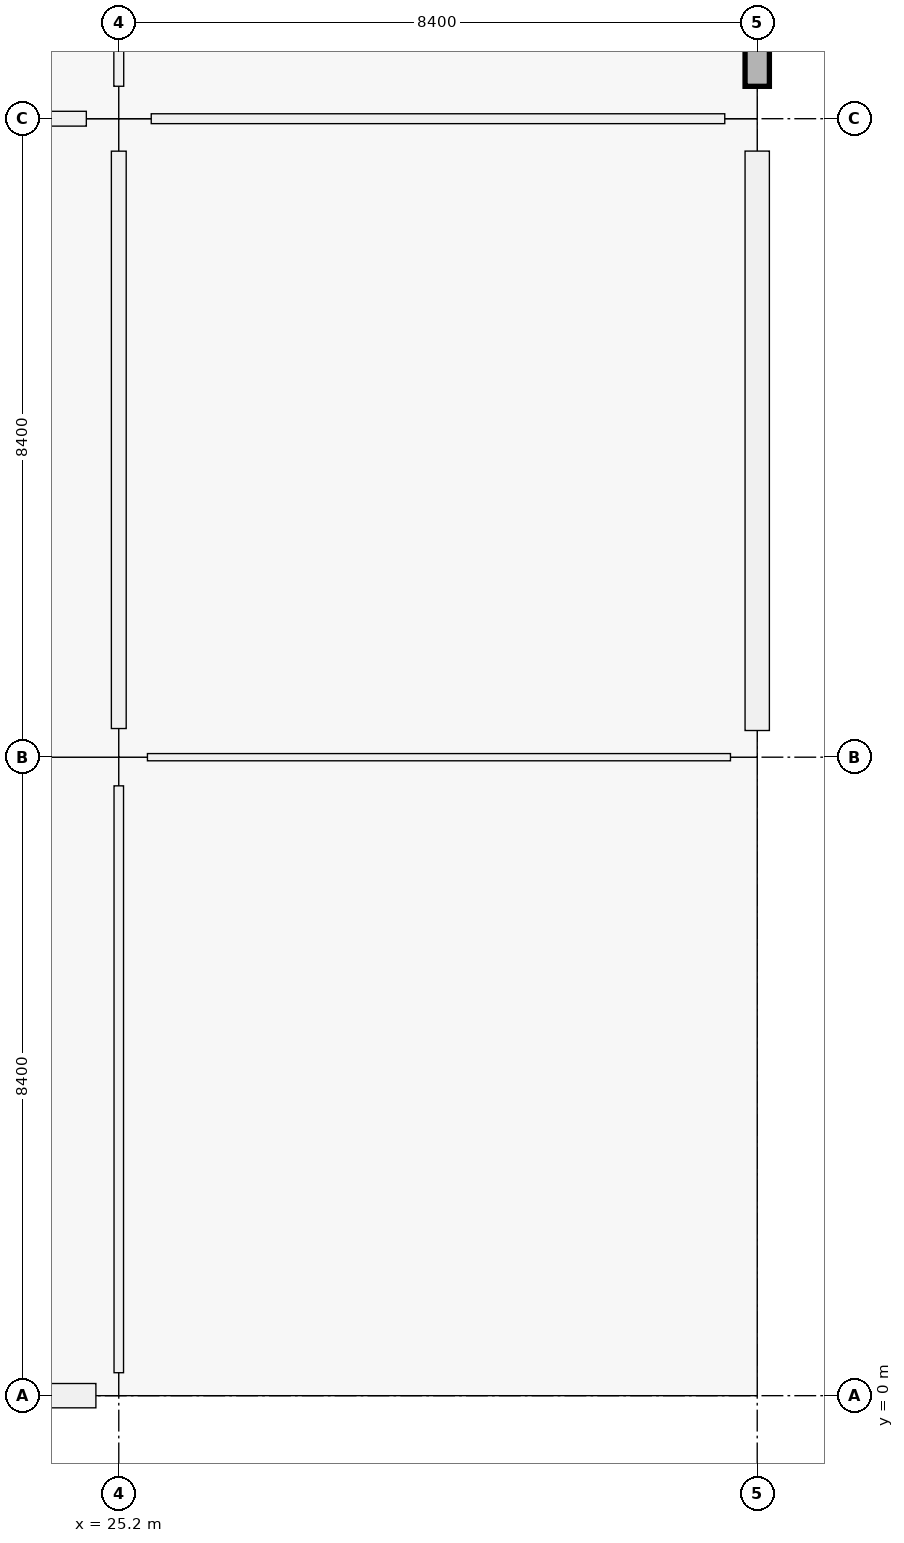
"""IFC4 building model, lengths in metres.
Left out: names, types, materials, properties, quantities, classifications, styles, units other than length and angle.
Written with IfcOpenShell. Run it as: python <this file> out.ifc"""

import sys

from ifc_helpers import new_model, si_unit, direction, frame, frame_2d, origin, origin_2d, place, context, subcontext, project, spatial, rectangle, extrude, element, fill, save


model = new_model("IFC4")
c1 = context("Model", 3, precision=1e-05, world=origin(), true_north=direction((0.0, 1.0)))
c2 = subcontext(c1, "Body", "Model", "MODEL_VIEW")
j1 = project(units=[si_unit("LENGTHUNIT", "METRE"), si_unit("PLANEANGLEUNIT", "RADIAN")], contexts=[c1])
p1 = place(None, origin())
s1 = spatial("IfcSite", under=j1, at=p1, CompositionType="ELEMENT")
p2 = place(p1, origin())
s2 = spatial("IfcBuilding", under=s1, at=p2, CompositionType="ELEMENT")
p3 = place(p2, origin())
s3 = spatial("IfcBuildingStorey", under=s2, at=p3, CompositionType="ELEMENT", Elevation=0.0)
p4 = place(p3, frame((25.2, 0.0, 0.0), z_axis=(0.0, 0.0, 1.0), x_axis=(1.0, 0.0, 0.0)))
e1 = element("IfcColumn", 1, at=p4, inside=s3, PredefinedType="COLUMN", context=c2, shape_type="SweptSolid", body=[
    extrude(rectangle(XDim=0.6, YDim=0.6, at=origin_2d()), origin(), (0.0, 0.0, 1.0), 5.76),
])
p5 = place(p3, frame((25.2, 8.4, 0.0), z_axis=(0.0, 0.0, 1.0), x_axis=(1.0, 0.0, 0.0)))
e2 = element("IfcColumn", 2, at=p5, inside=s3, PredefinedType="COLUMN", context=c2, shape_type="SweptSolid", body=[
    extrude(rectangle(XDim=0.75, YDim=0.75, at=origin_2d()), origin(), (0.0, 0.0, 1.0), 5.76),
])
p6 = place(p3, frame((25.2, 16.8, 0.0), z_axis=(0.0, 0.0, 1.0), x_axis=(1.0, 0.0, 0.0)))
e3 = element("IfcColumn", 3, at=p6, inside=s3, PredefinedType="COLUMN", context=c2, shape_type="SweptSolid", body=[
    extrude(rectangle(XDim=0.85, YDim=0.85, at=origin_2d()), origin(), (0.0, 0.0, 1.0), 5.76),
])
p7 = place(p3, frame((33.6, 0.0, 0.0), z_axis=(0.0, 0.0, 1.0), x_axis=(1.0, 0.0, 0.0)))
e4 = element("IfcColumn", 4, at=p7, inside=s3, PredefinedType="COLUMN", context=c2, shape_type="SweptSolid", body=[
    extrude(rectangle(XDim=0.65, YDim=0.65, at=origin_2d()), origin(), (0.0, 0.0, 1.0), 5.76),
])
p8 = place(p3, frame((33.6, 8.4, 0.0), z_axis=(0.0, 0.0, 1.0), x_axis=(1.0, 0.0, 0.0)))
e5 = element("IfcColumn", 5, at=p8, inside=s3, PredefinedType="COLUMN", context=c2, shape_type="SweptSolid", body=[
    extrude(rectangle(XDim=0.7, YDim=0.7, at=origin_2d()), origin(), (0.0, 0.0, 1.0), 5.76),
])
p9 = place(p3, frame((33.6, 16.8, 0.0), z_axis=(0.0, 0.0, 1.0), x_axis=(1.0, 0.0, 0.0)))
e6 = element("IfcColumn", 6, at=p9, inside=s3, PredefinedType="COLUMN", context=c2, shape_type="SweptSolid", body=[
    extrude(rectangle(XDim=0.85, YDim=0.85, at=origin_2d()), origin(), (0.0, 0.0, 1.0), 5.76),
])
p10 = place(p3, frame((24.899, 0.0, 0.0), z_axis=(0.0, 0.0, 1.0), x_axis=(-1.0, 0.0, 0.0)))
e7 = element("IfcWall", 7, at=p10, inside=s3, PredefinedType="SOLIDWALL", context=c2, shape_type="SweptSolid", body=[
    extrude(rectangle(XDim=7.773, YDim=0.32, at=frame_2d((3.886, 0.0))), origin(), (0.0, 0.0, 1.0), 4.7),
])
p11 = place(p10, frame((2.736, 0.0, 0.0)))
e8 = element("IfcOpeningElement", 8, at=p11, cuts=e7, PredefinedType="OPENING", context=c2, shape_type="SweptSolid", body=[
    extrude(rectangle(XDim=2.3, YDim=2.3, at=frame_2d((1.15, 1.15))), frame((0.0, 0.16, 0.0), z_axis=(0.0, -1.0, 0.0), x_axis=(1.0, 0.0, 0.0)), (0.0, 0.0, 1.0), 0.32),
])
p12 = place(p3, frame((33.6, 16.374, 0.0), z_axis=(0.0, 0.0, 1.0), x_axis=(0.0, -1.0, 0.0)))
e9 = element("IfcWall", 9, at=p12, inside=s3, PredefinedType="SOLIDWALL", context=c2, shape_type="SweptSolid", body=[
    extrude(rectangle(XDim=7.623, YDim=0.32, at=frame_2d((3.812, 0.0))), origin(), (0.0, 0.0, 1.0), 4.7),
])
p13 = place(p12, frame((2.462, 0.0, 0.9)))
e10 = element("IfcOpeningElement", 10, at=p13, cuts=e9, PredefinedType="OPENING", context=c2, shape_type="SweptSolid", body=[
    extrude(rectangle(XDim=2.7, YDim=1.2, at=frame_2d((1.35, 0.6))), frame((0.0, 0.16, 0.0), z_axis=(0.0, -1.0, 0.0), x_axis=(1.0, 0.0, 0.0)), (0.0, 0.0, 1.0), 0.32),
])
p14 = place(p3, frame((33.6, 24.774, 0.0), z_axis=(0.0, 0.0, 1.0), x_axis=(0.0, -1.0, 0.0)))
e11 = element("IfcWall", 11, at=p14, inside=s3, PredefinedType="SOLIDWALL", context=c2, shape_type="SweptSolid", body=[
    extrude(rectangle(XDim=7.548, YDim=0.32, at=frame_2d((3.774, 0.0))), origin(), (0.0, 0.0, 1.0), 4.7),
])
p15 = place(p14, frame((2.674, 0.0, 0.9)))
e12 = element("IfcOpeningElement", 12, at=p15, cuts=e11, PredefinedType="OPENING", context=c2, shape_type="SweptSolid", body=[
    extrude(rectangle(XDim=2.2, YDim=1.35, at=frame_2d((1.1, 0.675))), frame((0.0, 0.16, 0.0), z_axis=(0.0, -1.0, 0.0), x_axis=(1.0, 0.0, 0.0)), (0.0, 0.0, 1.0), 0.32),
])
p16 = place(p3, frame((17.227, 16.8, 0.0), z_axis=(0.0, 0.0, 1.0), x_axis=(1.0, 0.0, 0.0)))
e13 = element("IfcWall", 13, at=p16, inside=s3, PredefinedType="PARTITIONING", context=c2, shape_type="SweptSolid", body=[
    extrude(rectangle(XDim=7.546, YDim=0.195, at=frame_2d((3.773, 0.0))), origin(), (0.0, 0.0, 1.0), 3.66),
])
p17 = place(p16, frame((3.283, 0.0, 0.0)))
e14 = element("IfcOpeningElement", 14, at=p17, cuts=e13, PredefinedType="OPENING", context=c2, shape_type="SweptSolid", body=[
    extrude(rectangle(XDim=0.98, YDim=2.18, at=frame_2d((0.49, 1.09))), frame((0.0, 0.098, 0.0), z_axis=(0.0, -1.0, 0.0), x_axis=(1.0, 0.0, 0.0)), (0.0, 0.0, 1.0), 0.195),
])
p18 = place(p3, frame((25.577, 8.4, 0.0), z_axis=(0.0, 0.0, 1.0), x_axis=(1.0, 0.0, 0.0)))
e15 = element("IfcWall", 15, at=p18, inside=s3, PredefinedType="PARTITIONING", context=c2, shape_type="SweptSolid", body=[
    extrude(rectangle(XDim=7.671, YDim=0.095, at=frame_2d((3.835, 0.0))), origin(), (0.0, 0.0, 1.0), 3.66),
])
p19 = place(p18, frame((3.356, 0.0, 0.0)))
e16 = element("IfcOpeningElement", 16, at=p19, cuts=e15, PredefinedType="OPENING", context=c2, shape_type="SweptSolid", body=[
    extrude(rectangle(XDim=0.96, YDim=2.18, at=frame_2d((0.48, 1.09))), frame((0.0, 0.047, 0.0), z_axis=(0.0, -1.0, 0.0), x_axis=(1.0, 0.0, 0.0)), (0.0, 0.0, 1.0), 0.095),
])
p20 = place(p3, frame((25.627, 16.8, 0.0), z_axis=(0.0, 0.0, 1.0), x_axis=(1.0, 0.0, 0.0)))
e17 = element("IfcWall", 17, at=p20, inside=s3, PredefinedType="MOVABLE", context=c2, shape_type="SweptSolid", body=[
    extrude(rectangle(XDim=7.546, YDim=0.13, at=frame_2d((3.773, 0.0))), origin(), (0.0, 0.0, 1.0), 3.66),
])
p21 = place(p20, frame((3.303, 0.0, 0.0)))
e18 = element("IfcOpeningElement", 18, at=p21, cuts=e17, PredefinedType="OPENING", context=c2, shape_type="SweptSolid", body=[
    extrude(rectangle(XDim=0.94, YDim=2.15, at=frame_2d((0.47, 1.075))), frame((0.0, 0.065, 0.0), z_axis=(0.0, -1.0, 0.0), x_axis=(1.0, 0.0, 0.0)), (0.0, 0.0, 1.0), 0.13),
])
p22 = place(p3, frame((25.2, 0.302, 0.0), z_axis=(0.0, 0.0, 1.0), x_axis=(0.0, 1.0, 0.0)))
e19 = element("IfcWall", 19, at=p22, inside=s3, PredefinedType="PARTITIONING", context=c2, shape_type="SweptSolid", body=[
    extrude(rectangle(XDim=7.721, YDim=0.125, at=frame_2d((3.86, 0.0))), origin(), (0.0, 0.0, 1.0), 3.66),
])
p23 = place(p22, frame((3.381, 0.0, 0.0)))
e20 = element("IfcOpeningElement", 20, at=p23, cuts=e19, PredefinedType="OPENING", context=c2, shape_type="SweptSolid", body=[
    extrude(rectangle(XDim=0.96, YDim=2.18, at=frame_2d((0.48, 1.09))), frame((0.0, 0.062, 0.0), z_axis=(0.0, -1.0, 0.0), x_axis=(1.0, 0.0, 0.0)), (0.0, 0.0, 1.0), 0.125),
])
p24 = place(p3, frame((25.2, 8.777, 0.0), z_axis=(0.0, 0.0, 1.0), x_axis=(0.0, 1.0, 0.0)))
e21 = element("IfcWall", 21, at=p24, inside=s3, PredefinedType="PARTITIONING", context=c2, shape_type="SweptSolid", body=[
    extrude(rectangle(XDim=7.596, YDim=0.195, at=frame_2d((3.798, 0.0))), origin(), (0.0, 0.0, 1.0), 3.66),
])
p25 = place(p24, frame((3.328, 0.0, 0.0)))
e22 = element("IfcOpeningElement", 22, at=p25, cuts=e21, PredefinedType="OPENING", context=c2, shape_type="SweptSolid", body=[
    extrude(rectangle(XDim=0.94, YDim=2.15, at=frame_2d((0.47, 1.075))), frame((0.0, 0.098, 0.0), z_axis=(0.0, -1.0, 0.0), x_axis=(1.0, 0.0, 0.0)), (0.0, 0.0, 1.0), 0.195),
])
p26 = place(p3, frame((25.2, 17.227, 0.0), z_axis=(0.0, 0.0, 1.0), x_axis=(0.0, 1.0, 0.0)))
e23 = element("IfcWall", 23, at=p26, inside=s3, PredefinedType="MOVABLE", context=c2, shape_type="SweptSolid", body=[
    extrude(rectangle(XDim=7.546, YDim=0.13, at=frame_2d((3.773, 0.0))), origin(), (0.0, 0.0, 1.0), 3.66),
])
p27 = place(p26, frame((3.268, 0.0, 0.0)))
e24 = element("IfcOpeningElement", 24, at=p27, cuts=e23, PredefinedType="OPENING", context=c2, shape_type="SweptSolid", body=[
    extrude(rectangle(XDim=1.01, YDim=2.12, at=frame_2d((0.505, 1.06))), frame((0.0, 0.065, 0.0), z_axis=(0.0, -1.0, 0.0), x_axis=(1.0, 0.0, 0.0)), (0.0, 0.0, 1.0), 0.13),
])
p28 = place(p13, origin())
e25 = element("IfcWindow", 25, at=p28, inside=s3, PartitioningType="SINGLE_PANEL", PredefinedType="WINDOW", context=c2, shape_type="SweptSolid", body=[
    extrude(rectangle(XDim=2.7, YDim=1.2, at=frame_2d((1.35, 0.6))), frame((0.0, 0.03, 0.0), z_axis=(0.0, -1.0, 0.0), x_axis=(1.0, 0.0, 0.0)), (0.0, 0.0, 1.0), 0.06),
])
fill(e10, e25)
p29 = place(p19, origin())
e26 = element("IfcDoor", 26, at=p29, inside=s3, OperationType="SINGLE_SWING_RIGHT", PredefinedType="DOOR", context=c2, shape_type="SweptSolid", body=[
    extrude(rectangle(XDim=0.96, YDim=2.18, at=frame_2d((0.48, 1.09))), frame((0.0, 0.025, 0.0), z_axis=(0.0, -1.0, 0.0), x_axis=(1.0, 0.0, 0.0)), (0.0, 0.0, 1.0), 0.05),
])
fill(e16, e26)
p30 = place(p21, origin())
e27 = element("IfcDoor", 27, at=p30, inside=s3, OperationType="SINGLE_SWING_LEFT", PredefinedType="DOOR", context=c2, shape_type="SweptSolid", body=[
    extrude(rectangle(XDim=0.94, YDim=2.15, at=frame_2d((0.47, 1.075))), frame((0.0, 0.025, 0.0), z_axis=(0.0, -1.0, 0.0), x_axis=(1.0, 0.0, 0.0)), (0.0, 0.0, 1.0), 0.05),
])
fill(e18, e27)
p31 = place(p23, origin())
e28 = element("IfcDoor", 28, at=p31, inside=s3, OperationType="SINGLE_SWING_LEFT", PredefinedType="DOOR", context=c2, shape_type="SweptSolid", body=[
    extrude(rectangle(XDim=0.96, YDim=2.18, at=frame_2d((0.48, 1.09))), frame((0.0, 0.025, 0.0), z_axis=(0.0, -1.0, 0.0), x_axis=(1.0, 0.0, 0.0)), (0.0, 0.0, 1.0), 0.05),
])
fill(e20, e28)
p32 = place(p25, origin())
e29 = element("IfcDoor", 29, at=p32, inside=s3, OperationType="SINGLE_SWING_RIGHT", PredefinedType="DOOR", context=c2, shape_type="SweptSolid", body=[
    extrude(rectangle(XDim=0.94, YDim=2.15, at=frame_2d((0.47, 1.075))), frame((0.0, 0.025, 0.0), z_axis=(0.0, -1.0, 0.0), x_axis=(1.0, 0.0, 0.0)), (0.0, 0.0, 1.0), 0.05),
])
fill(e22, e29)
save(model, sys.argv[1])
